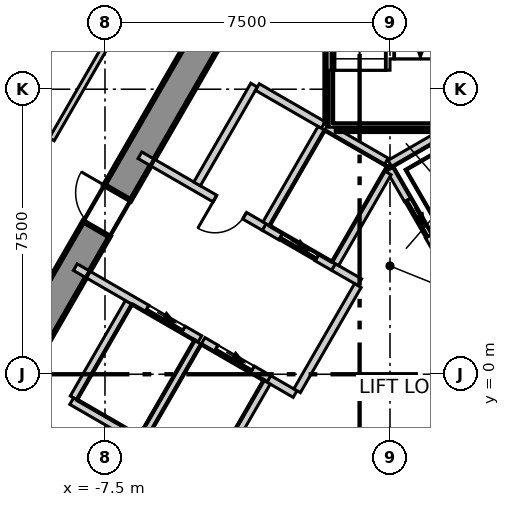
"""IFC4 building model, lengths in metres.
Left out: names, types, materials, properties, quantities, classifications, styles, units other than length and angle.
Written with IfcOpenShell. Run it as: python <this file> out.ifc"""

import sys

from ifc_helpers import new_model, si_unit, direction, frame, frame_2d, origin, place, context, subcontext, project, spatial, polyline, rectangle, outline, extrude, element, fill, save


model = new_model("IFC4")
c1 = context("Model", 3, precision=1e-05, world=origin(), true_north=direction((0.0, 1.0)))
c2 = subcontext(c1, "Body", "Model", "MODEL_VIEW")
j1 = project(units=[si_unit("LENGTHUNIT", "METRE"), si_unit("PLANEANGLEUNIT", "RADIAN")], contexts=[c1])
p1 = place(None, origin())
s1 = spatial("IfcSite", under=j1, at=p1, CompositionType="ELEMENT")
p2 = place(p1, origin())
s2 = spatial("IfcBuilding", under=s1, at=p2, CompositionType="ELEMENT")
p3 = place(p2, frame((0.0, 0.0, 140.3)))
s3 = spatial("IfcBuildingStorey", under=s2, at=p3, CompositionType="ELEMENT", Elevation=140.3)
p4 = place(p3, frame((-1.674, 14.3, -0.3), z_axis=(0.0, 0.0, 1.0), x_axis=(-0.499995765644, -0.866027848477, 0.0)))
e1 = element("IfcWall", 1, at=p4, inside=s3, PredefinedType="SHEAR", context=c2, shape_type="SweptSolid", body=[
    extrude(outline(polyline([(-0.231, -0.4), (1.732, -0.4), (3.695, -0.4), (5.658, -0.4), (7.621, -0.4), (9.584, -0.4), (11.547, -0.4), (13.51, -0.4), (15.473, -0.4), (17.436, -0.4), (19.399, -0.4), (21.362, -0.4), (23.325, -0.4), (22.863, 0.4), (20.977, 0.4), (19.091, 0.4), (17.205, 0.4), (15.319, 0.4), (13.433, 0.4), (11.547, 0.4), (9.661, 0.4), (7.775, 0.4), (5.889, 0.4), (4.003, 0.4), (2.117, 0.4), (0.231, 0.4), (-0.231, -0.4)])), origin(), (0.0, 0.0, 1.0), 4.0),
])
p5 = place(p4, frame((10.997, 0.0, 0.3)))
e2 = element("IfcOpeningElement", 2, at=p5, cuts=e1, PredefinedType="OPENING", context=c2, shape_type="SweptSolid", body=[
    extrude(rectangle(XDim=1.1, YDim=2.1, at=frame_2d((0.55, 1.05))), frame((0.0, 0.41, 0.0), z_axis=(0.0, -1.0, 0.0), x_axis=(1.0, 0.0, 0.0)), (0.0, 0.0, 1.0), 0.82),
])
p6 = place(p4, frame((4.474, 0.0, 0.3)))
e3 = element("IfcOpeningElement", 3, at=p6, cuts=e1, PredefinedType="OPENING", context=c2, shape_type="SweptSolid", body=[
    extrude(rectangle(XDim=0.9, YDim=2.1, at=frame_2d((0.45, 1.05))), frame((0.0, 0.41, 0.0), z_axis=(0.0, -1.0, 0.0), x_axis=(1.0, 0.0, 0.0)), (0.0, 0.0, 1.0), 0.82),
])
p7 = place(p3, frame((-3.063, 34.172, 0.0), z_axis=(0.0, 0.0, 1.0), x_axis=(-0.500008098571, -0.866020728022, 0.0)))
e4 = element("IfcWall", 4, at=p7, inside=s3, PredefinedType="ELEMENTEDWALL", context=c2, shape_type="SweptSolid", body=[
    extrude(rectangle(XDim=56.105, YDim=0.2, at=frame_2d((28.052, 0.0))), origin(), (0.0, 0.0, 1.0), 3.7),
])
p8 = place(p7, frame((2.197, 0.0, 0.9)))
e5 = element("IfcOpeningElement", 5, at=p8, cuts=e4, PredefinedType="OPENING", context=c2, shape_type="SweptSolid", body=[
    extrude(rectangle(XDim=4.9, YDim=2.5, at=frame_2d((2.45, 1.25))), frame((0.0, 0.11, 0.0), z_axis=(0.0, -1.0, 0.0), x_axis=(1.0, 0.0, 0.0)), (0.0, 0.0, 1.0), 0.22),
])
p9 = place(p7, frame((8.887, 0.0, 0.9)))
e6 = element("IfcOpeningElement", 6, at=p9, cuts=e4, PredefinedType="OPENING", context=c2, shape_type="SweptSolid", body=[
    extrude(rectangle(XDim=4.9, YDim=2.5, at=frame_2d((2.45, 1.25))), frame((0.0, 0.11, 0.0), z_axis=(0.0, -1.0, 0.0), x_axis=(1.0, 0.0, 0.0)), (0.0, 0.0, 1.0), 0.22),
])
p10 = place(p7, frame((15.577, 0.0, 0.9)))
e7 = element("IfcOpeningElement", 7, at=p10, cuts=e4, PredefinedType="OPENING", context=c2, shape_type="SweptSolid", body=[
    extrude(rectangle(XDim=4.9, YDim=2.5, at=frame_2d((2.45, 1.25))), frame((0.0, 0.11, 0.0), z_axis=(0.0, -1.0, 0.0), x_axis=(1.0, 0.0, 0.0)), (0.0, 0.0, 1.0), 0.22),
])
p11 = place(p7, frame((22.267, 0.0, 0.9)))
e8 = element("IfcOpeningElement", 8, at=p11, cuts=e4, PredefinedType="OPENING", context=c2, shape_type="SweptSolid", body=[
    extrude(rectangle(XDim=4.9, YDim=2.5, at=frame_2d((2.45, 1.25))), frame((0.0, 0.11, 0.0), z_axis=(0.0, -1.0, 0.0), x_axis=(1.0, 0.0, 0.0)), (0.0, 0.0, 1.0), 0.22),
])
p12 = place(p7, frame((28.957, 0.0, 0.9)))
e9 = element("IfcOpeningElement", 9, at=p12, cuts=e4, PredefinedType="OPENING", context=c2, shape_type="SweptSolid", body=[
    extrude(rectangle(XDim=4.9, YDim=2.5, at=frame_2d((2.45, 1.25))), frame((0.0, 0.11, 0.0), z_axis=(0.0, -1.0, 0.0), x_axis=(1.0, 0.0, 0.0)), (0.0, 0.0, 1.0), 0.22),
])
p13 = place(p7, frame((35.647, 0.0, 0.9)))
e10 = element("IfcOpeningElement", 10, at=p13, cuts=e4, PredefinedType="OPENING", context=c2, shape_type="SweptSolid", body=[
    extrude(rectangle(XDim=4.9, YDim=2.5, at=frame_2d((2.45, 1.25))), frame((0.0, 0.11, 0.0), z_axis=(0.0, -1.0, 0.0), x_axis=(1.0, 0.0, 0.0)), (0.0, 0.0, 1.0), 0.22),
])
p14 = place(p7, frame((42.337, 0.0, 0.9)))
e11 = element("IfcOpeningElement", 11, at=p14, cuts=e4, PredefinedType="OPENING", context=c2, shape_type="SweptSolid", body=[
    extrude(rectangle(XDim=4.9, YDim=2.5, at=frame_2d((2.45, 1.25))), frame((0.0, 0.11, 0.0), z_axis=(0.0, -1.0, 0.0), x_axis=(1.0, 0.0, 0.0)), (0.0, 0.0, 1.0), 0.22),
])
p15 = place(p7, frame((49.027, 0.0, 0.9)))
e12 = element("IfcOpeningElement", 12, at=p15, cuts=e4, PredefinedType="OPENING", context=c2, shape_type="SweptSolid", body=[
    extrude(rectangle(XDim=4.9, YDim=2.5, at=frame_2d((2.45, 1.25))), frame((0.0, 0.11, 0.0), z_axis=(0.0, -1.0, 0.0), x_axis=(1.0, 0.0, 0.0)), (0.0, 0.0, 1.0), 0.22),
])
p16 = place(p3, frame((-8.902, 6.181, 0.0), z_axis=(0.0, 0.0, 1.0), x_axis=(0.499992688384, 0.866029625107, 0.0)))
e13 = element("IfcWall", 13, at=p16, inside=s3, PredefinedType="PARTITIONING", context=c2, shape_type="SweptSolid", body=[
    extrude(rectangle(XDim=17.804, YDim=0.15, at=frame_2d((8.902, 0.0))), origin(), (0.0, 0.0, 1.0), 3.7),
])
p17 = place(p16, frame((14.554, 0.0, 0.0)))
e14 = element("IfcOpeningElement", 14, at=p17, cuts=e13, PredefinedType="OPENING", context=c2, shape_type="SweptSolid", body=[
    extrude(rectangle(XDim=1.1, YDim=2.1, at=frame_2d((0.55, 1.05))), frame((0.0, 0.085, 0.0), z_axis=(0.0, -1.0, 0.0), x_axis=(1.0, 0.0, 0.0)), (0.0, 0.0, 1.0), 0.17),
])
p18 = place(p16, frame((10.428, 0.0, 0.0)))
e15 = element("IfcOpeningElement", 15, at=p18, cuts=e13, PredefinedType="OPENING", context=c2, shape_type="SweptSolid", body=[
    extrude(rectangle(XDim=0.9, YDim=2.1, at=frame_2d((0.45, 1.05))), frame((0.0, 0.085, 0.0), z_axis=(0.0, -1.0, 0.0), x_axis=(1.0, 0.0, 0.0)), (0.0, 0.0, 1.0), 0.17),
])
p19 = place(p16, frame((7.228, 0.0, 0.0)))
e16 = element("IfcOpeningElement", 16, at=p19, cuts=e13, PredefinedType="OPENING", context=c2, shape_type="SweptSolid", body=[
    extrude(rectangle(XDim=0.9, YDim=2.1, at=frame_2d((0.45, 1.05))), frame((0.0, 0.085, 0.0), z_axis=(0.0, -1.0, 0.0), x_axis=(1.0, 0.0, 0.0)), (0.0, 0.0, 1.0), 0.17),
])
p20 = place(p16, frame((4.428, 0.0, 0.0)))
e17 = element("IfcOpeningElement", 17, at=p20, cuts=e13, PredefinedType="OPENING", context=c2, shape_type="SweptSolid", body=[
    extrude(rectangle(XDim=1.0, YDim=2.1, at=frame_2d((0.5, 1.05))), frame((0.0, 0.085, 0.0), z_axis=(0.0, -1.0, 0.0), x_axis=(1.0, 0.0, 0.0)), (0.0, 0.0, 1.0), 0.17),
])
p21 = place(p3, frame((0.076, 21.468, 0.0), z_axis=(0.0, 0.0, 1.0), x_axis=(0.499999691263, -0.866025582034, 0.0)))
e18 = element("IfcWall", 18, at=p21, inside=s3, PredefinedType="PARTITIONING", context=c2, shape_type="SweptSolid", body=[
    extrude(rectangle(XDim=24.342, YDim=0.15, at=frame_2d((12.171, 0.0))), origin(), (0.0, 0.0, 1.0), 3.7),
])
p22 = place(p21, frame((17.594, 0.0, 0.0)))
e19 = element("IfcOpeningElement", 19, at=p22, cuts=e18, PredefinedType="OPENING", context=c2, shape_type="SweptSolid", body=[
    extrude(rectangle(XDim=1.1, YDim=2.1, at=frame_2d((0.55, 1.05))), frame((0.0, 0.085, 0.0), z_axis=(0.0, -1.0, 0.0), x_axis=(1.0, 0.0, 0.0)), (0.0, 0.0, 1.0), 0.17),
])
p23 = place(p21, frame((6.814, 0.0, 0.0)))
e20 = element("IfcOpeningElement", 20, at=p23, cuts=e18, PredefinedType="OPENING", context=c2, shape_type="SweptSolid", body=[
    extrude(rectangle(XDim=1.0, YDim=2.1, at=frame_2d((0.5, 1.05))), frame((0.0, 0.085, 0.0), z_axis=(0.0, -1.0, 0.0), x_axis=(1.0, 0.0, 0.0)), (0.0, 0.0, 1.0), 0.17),
])
p24 = place(p21, frame((10.214, 0.0, 0.0)))
e21 = element("IfcOpeningElement", 21, at=p24, cuts=e18, PredefinedType="OPENING", context=c2, shape_type="SweptSolid", body=[
    extrude(rectangle(XDim=0.9, YDim=2.1, at=frame_2d((0.45, 1.05))), frame((0.0, 0.085, 0.0), z_axis=(0.0, -1.0, 0.0), x_axis=(1.0, 0.0, 0.0)), (0.0, 0.0, 1.0), 0.17),
])
p25 = place(p21, frame((1.924, 0.0, 0.0)))
e22 = element("IfcOpeningElement", 22, at=p25, cuts=e18, PredefinedType="OPENING", context=c2, shape_type="SweptSolid", body=[
    extrude(rectangle(XDim=1.1, YDim=2.1, at=frame_2d((0.55, 1.05))), frame((0.0, 0.085, 0.0), z_axis=(0.0, -1.0, 0.0), x_axis=(1.0, 0.0, 0.0)), (0.0, 0.0, 1.0), 0.17),
])
p26 = place(p3, frame((-8.376, -0.707, 0.0), z_axis=(0.0, 0.0, 1.0), x_axis=(0.866067520717, -0.499927044236, 0.0)))
e23 = element("IfcWall", 23, at=p26, inside=s3, PredefinedType="SOLIDWALL", context=c2, shape_type="SweptSolid", body=[
    extrude(rectangle(XDim=2.1, YDim=0.2, at=frame_2d((1.05, 0.0))), origin(), (0.0, 0.0, 1.0), 3.7),
])
p27 = place(p3, frame((-8.326, -0.62, 0.0), z_axis=(0.0, 0.0, 1.0), x_axis=(0.500023687443, 0.866011727401, 0.0)))
e24 = element("IfcWall", 24, at=p27, inside=s3, PredefinedType="SOLIDWALL", context=c2, shape_type="SweptSolid", body=[
    extrude(rectangle(XDim=2.9, YDim=0.2, at=frame_2d((1.45, 0.0))), origin(), (0.0, 0.0, 1.0), 3.7),
])
p28 = place(p3, frame((-0.002, 5.542, 0.0), z_axis=(0.0, 0.0, 1.0), x_axis=(0.866103910842, 0.499863997127, 0.0)))
e25 = element("IfcWall", 25, at=p28, inside=s3, PredefinedType="SOLIDWALL", context=c2, shape_type="SweptSolid", body=[
    extrude(rectangle(XDim=4.131, YDim=0.2, at=frame_2d((2.065, 0.0))), origin(), (0.0, 0.0, 1.0), 3.7),
])
p29 = place(p3, frame((0.0, 5.4, 0.0), z_axis=(0.0, 0.0, 1.0), x_axis=(0.500103862429, -0.865965430478, 0.0)))
e26 = element("IfcWall", 26, at=p29, inside=s3, PredefinedType="SOLIDWALL", context=c2, shape_type="SweptSolid", body=[
    extrude(rectangle(XDim=2.973, YDim=0.2, at=frame_2d((1.487, 0.0))), origin(), (0.0, 0.0, 1.0), 3.7),
])
p30 = place(p29, frame((0.937, 0.0, 0.0)))
e27 = element("IfcOpeningElement", 27, at=p30, cuts=e26, PredefinedType="OPENING", context=c2, shape_type="SweptSolid", body=[
    extrude(rectangle(XDim=1.1, YDim=2.1, at=frame_2d((0.55, 1.05))), frame((0.0, 0.11, 0.0), z_axis=(0.0, -1.0, 0.0), x_axis=(1.0, 0.0, 0.0)), (0.0, 0.0, 1.0), 0.22),
])
p31 = place(p3, frame((-8.28, 2.818, 0.0), z_axis=(0.0, 0.0, 1.0), x_axis=(0.86600175068, -0.50004096614, 0.0)))
e28 = element("IfcWall", 28, at=p31, inside=s3, PredefinedType="SOLIDWALL", context=c2, shape_type="SweptSolid", body=[
    extrude(rectangle(XDim=3.782, YDim=0.2, at=frame_2d((1.891, 0.0))), origin(), (0.0, 0.0, 1.0), 3.7),
])
p32 = place(p31, frame((2.18, 0.0, 0.0)))
e29 = element("IfcOpeningElement", 29, at=p32, cuts=e28, PredefinedType="OPENING", context=c2, shape_type="SweptSolid", body=[
    extrude(rectangle(XDim=1.1, YDim=2.1, at=frame_2d((0.55, 1.05))), frame((0.0, 0.11, 0.0), z_axis=(0.0, -1.0, 0.0), x_axis=(1.0, 0.0, 0.0)), (0.0, 0.0, 1.0), 0.22),
])
p33 = place(p3, frame((-3.188, -0.122, 0.0), z_axis=(0.0, 0.0, 1.0), x_axis=(0.865705793592, -0.50055317294, 0.0)))
e30 = element("IfcWall", 30, at=p33, inside=s3, PredefinedType="SOLIDWALL", context=c2, shape_type="SweptSolid", body=[
    extrude(rectangle(XDim=0.797, YDim=0.2, at=frame_2d((0.398, 0.0))), origin(), (0.0, 0.0, 1.0), 3.7),
])
p34 = place(p3, frame((-6.58, 5.762, 0.0), z_axis=(0.0, 0.0, 1.0), x_axis=(0.866029704776, -0.49999255039, 0.0)))
e31 = element("IfcWall", 31, at=p34, inside=s3, PredefinedType="SOLIDWALL", context=c2, shape_type="SweptSolid", body=[
    extrude(rectangle(XDim=3.782, YDim=0.2, at=frame_2d((1.891, 0.0))), origin(), (0.0, 0.0, 1.0), 3.7),
])
p35 = place(p34, frame((2.279, 0.0, 0.0)))
e32 = element("IfcOpeningElement", 32, at=p35, cuts=e31, PredefinedType="OPENING", context=c2, shape_type="SweptSolid", body=[
    extrude(rectangle(XDim=0.9, YDim=2.1, at=frame_2d((0.45, 1.05))), frame((0.0, 0.11, 0.0), z_axis=(0.0, -1.0, 0.0), x_axis=(1.0, 0.0, 0.0)), (0.0, 0.0, 1.0), 0.22),
])
p36 = place(p3, frame((-1.488, 2.822, 0.0), z_axis=(0.0, 0.0, 1.0), x_axis=(0.866236612152, -0.499633997809, 0.0)))
e33 = element("IfcWall", 33, at=p36, inside=s3, PredefinedType="SOLIDWALL", context=c2, shape_type="SweptSolid", body=[
    extrude(rectangle(XDim=0.796, YDim=0.2, at=frame_2d((0.398, 0.0))), origin(), (0.0, 0.0, 1.0), 3.7),
])
p37 = place(p3, frame((-5.076, 5.009, 0.0), z_axis=(0.0, 0.0, 1.0), x_axis=(0.50002537861, 0.866010750942, 0.0)))
e34 = element("IfcWall", 34, at=p37, inside=s3, PredefinedType="SOLIDWALL", context=c2, shape_type="SweptSolid", body=[
    extrude(rectangle(XDim=3.0, YDim=0.2, at=frame_2d((1.5, 0.0))), origin(), (0.0, 0.0, 1.0), 3.7),
])
p38 = place(p3, frame((-3.489, 7.557, 0.0), z_axis=(0.0, 0.0, 1.0), x_axis=(0.866010750942, -0.50002537861, 0.0)))
e35 = element("IfcWall", 35, at=p38, inside=s3, PredefinedType="SOLIDWALL", context=c2, shape_type="SweptSolid", body=[
    extrude(rectangle(XDim=2.0, YDim=0.2, at=frame_2d((1.0, 0.0))), origin(), (0.0, 0.0, 1.0), 3.7),
])
p39 = place(p3, frame((-2.444, -0.433, 0.0), z_axis=(0.0, 0.0, 1.0), x_axis=(0.500035624827, 0.866004834804, 0.0)))
e36 = element("IfcWall", 36, at=p39, inside=s3, PredefinedType="SOLIDWALL", context=c2, shape_type="SweptSolid", body=[
    extrude(rectangle(XDim=3.194, YDim=0.2, at=frame_2d((1.597, 0.0))), origin(), (0.0, 0.0, 1.0), 3.7),
])
p40 = place(p3, frame((-6.507, -1.67, 0.0), z_axis=(0.0, 0.0, 1.0), x_axis=(0.50012328804, 0.865954211699, 0.0)))
e37 = element("IfcWall", 37, at=p40, inside=s3, PredefinedType="SOLIDWALL", context=c2, shape_type="SweptSolid", body=[
    extrude(rectangle(XDim=2.9, YDim=0.2, at=frame_2d((1.45, 0.0))), origin(), (0.0, 0.0, 1.0), 3.7),
])
p41 = place(p3, frame((-4.92, 0.878, 0.0), z_axis=(0.0, 0.0, 1.0), x_axis=(0.866010750942, -0.50002537861, 0.0)))
e38 = element("IfcWall", 38, at=p41, inside=s3, PredefinedType="SOLIDWALL", context=c2, shape_type="SweptSolid", body=[
    extrude(rectangle(XDim=2.0, YDim=0.2, at=frame_2d((1.0, 0.0))), origin(), (0.0, 0.0, 1.0), 3.7),
])
p42 = place(p41, frame((0.4, 0.0, 0.0)))
e39 = element("IfcOpeningElement", 39, at=p42, cuts=e38, PredefinedType="OPENING", context=c2, shape_type="SweptSolid", body=[
    extrude(rectangle(XDim=1.1, YDim=2.1, at=frame_2d((0.55, 1.05))), frame((0.0, 0.11, 0.0), z_axis=(0.0, -1.0, 0.0), x_axis=(1.0, 0.0, 0.0)), (0.0, 0.0, 1.0), 0.22),
])
p43 = place(p3, frame((-4.619, -2.6, 0.0), z_axis=(0.0, 0.0, 1.0), x_axis=(0.50009492287, 0.865970593103, 0.0)))
e40 = element("IfcWall", 40, at=p43, inside=s3, PredefinedType="SOLIDWALL", context=c2, shape_type="SweptSolid", body=[
    extrude(rectangle(XDim=2.761, YDim=0.2, at=frame_2d((1.381, 0.0))), origin(), (0.0, 0.0, 1.0), 3.7),
])
p44 = place(p3, frame((-3.309, 3.873, 0.0), z_axis=(0.0, 0.0, 1.0), x_axis=(0.866098583652, -0.499873227325, 0.0)))
e41 = element("IfcWall", 41, at=p44, inside=s3, PredefinedType="SOLIDWALL", context=c2, shape_type="SweptSolid", body=[
    extrude(rectangle(XDim=2.103, YDim=0.2, at=frame_2d((1.051, 0.0))), origin(), (0.0, 0.0, 1.0), 3.7),
])
p45 = place(p44, frame((0.502, 0.0, 0.0)))
e42 = element("IfcOpeningElement", 42, at=p45, cuts=e41, PredefinedType="OPENING", context=c2, shape_type="SweptSolid", body=[
    extrude(rectangle(XDim=1.1, YDim=2.1, at=frame_2d((0.55, 1.05))), frame((0.0, 0.11, 0.0), z_axis=(0.0, -1.0, 0.0), x_axis=(1.0, 0.0, 0.0)), (0.0, 0.0, 1.0), 0.22),
])
p46 = place(p3, frame((-3.257, 3.959, 0.0), z_axis=(0.0, 0.0, 1.0), x_axis=(0.50012328804, 0.865954211699, 0.0)))
e43 = element("IfcWall", 43, at=p46, inside=s3, PredefinedType="SOLIDWALL", context=c2, shape_type="SweptSolid", body=[
    extrude(rectangle(XDim=2.9, YDim=0.2, at=frame_2d((1.45, 0.0))), origin(), (0.0, 0.0, 1.0), 3.7),
])
p47 = place(p3, frame((-1.67, 6.507, 0.0), z_axis=(0.0, 0.0, 1.0), x_axis=(0.865941441609, -0.500145398563, 0.0)))
e44 = element("IfcWall", 44, at=p47, inside=s3, PredefinedType="SOLIDWALL", context=c2, shape_type="SweptSolid", body=[
    extrude(rectangle(XDim=1.815, YDim=0.2, at=frame_2d((0.908, 0.0))), origin(), (0.0, 0.0, 1.0), 3.7),
])
p48 = place(p3, frame((-1.438, 2.909, 0.0), z_axis=(0.0, 0.0, 1.0), x_axis=(0.499829630636, 0.866123744241, 0.0)))
e45 = element("IfcWall", 45, at=p48, inside=s3, PredefinedType="SOLIDWALL", context=c2, shape_type="SweptSolid", body=[
    extrude(rectangle(XDim=2.761, YDim=0.2, at=frame_2d((1.38, 0.0))), origin(), (0.0, 0.0, 1.0), 3.7),
])
p49 = place(p3, frame((-1.4, 6.5, 0.0), z_axis=(0.0, 0.0, 1.0), x_axis=(1.0, 0.0, 0.0)))
e46 = element("IfcWall", 46, at=p49, inside=s3, PredefinedType="SOLIDWALL", context=c2, shape_type="SweptSolid", body=[
    extrude(rectangle(XDim=2.8, YDim=0.2, at=frame_2d((1.4, 0.0))), origin(), (0.0, 0.0, 1.0), 3.7),
])
p50 = place(p3, frame((-1.6, 6.615, 0.0), z_axis=(0.0, 0.0, 1.0), x_axis=(0.0, 1.0, 0.0)))
e47 = element("IfcWall", 47, at=p50, inside=s3, PredefinedType="SOLIDWALL", context=c2, shape_type="SweptSolid", body=[
    extrude(rectangle(XDim=7.665, YDim=0.2, at=frame_2d((3.833, 0.0))), origin(), (0.0, 0.0, 1.0), 3.7),
])
p51 = place(p30, origin())
e48 = element("IfcDoor", 48, at=p51, inside=s3, OperationType="SLIDING_TO_LEFT", PredefinedType="DOOR", context=c2, shape_type="SweptSolid", body=[
    extrude(rectangle(XDim=1.1, YDim=2.1, at=frame_2d((0.55, 1.05))), frame((0.0, 0.025, 0.0), z_axis=(0.0, -1.0, 0.0), x_axis=(1.0, 0.0, 0.0)), (0.0, 0.0, 1.0), 0.05),
])
fill(e27, e48)
p52 = place(p42, origin())
e49 = element("IfcDoor", 49, at=p52, inside=s3, OperationType="SLIDING_TO_LEFT", PredefinedType="DOOR", context=c2, shape_type="SweptSolid", body=[
    extrude(rectangle(XDim=1.1, YDim=2.1, at=frame_2d((0.55, 1.05))), frame((0.0, 0.025, 0.0), z_axis=(0.0, -1.0, 0.0), x_axis=(1.0, 0.0, 0.0)), (0.0, 0.0, 1.0), 0.05),
])
fill(e39, e49)
p53 = place(p45, origin())
e50 = element("IfcDoor", 50, at=p53, inside=s3, OperationType="SLIDING_TO_LEFT", PredefinedType="DOOR", context=c2, shape_type="SweptSolid", body=[
    extrude(rectangle(XDim=1.1, YDim=2.1, at=frame_2d((0.55, 1.05))), frame((0.0, 0.025, 0.0), z_axis=(0.0, -1.0, 0.0), x_axis=(1.0, 0.0, 0.0)), (0.0, 0.0, 1.0), 0.05),
])
fill(e42, e50)
p54 = place(p32, origin())
e51 = element("IfcDoor", 51, at=p54, inside=s3, OperationType="SLIDING_TO_LEFT", PredefinedType="DOOR", context=c2, shape_type="SweptSolid", body=[
    extrude(rectangle(XDim=1.1, YDim=2.1, at=frame_2d((0.55, 1.05))), frame((0.0, 0.025, 0.0), z_axis=(0.0, -1.0, 0.0), x_axis=(1.0, 0.0, 0.0)), (0.0, 0.0, 1.0), 0.05),
])
fill(e29, e51)
p55 = place(p35, origin())
e52 = element("IfcDoor", 52, at=p55, inside=s3, OperationType="SINGLE_SWING_LEFT", PredefinedType="DOOR", context=c2, shape_type="SweptSolid", body=[
    extrude(rectangle(XDim=0.9, YDim=2.1, at=frame_2d((0.45, 1.05))), frame((0.0, 0.025, 0.0), z_axis=(0.0, -1.0, 0.0), x_axis=(1.0, 0.0, 0.0)), (0.0, 0.0, 1.0), 0.05),
])
fill(e32, e52)
p56 = place(p5, origin())
e53 = element("IfcDoor", 53, at=p56, inside=s3, OperationType="SINGLE_SWING_LEFT", PredefinedType="DOOR", context=c2, shape_type="SweptSolid", body=[
    extrude(rectangle(XDim=1.1, YDim=2.1, at=frame_2d((0.55, 1.05))), frame((0.0, 0.025, 0.0), z_axis=(0.0, -1.0, 0.0), x_axis=(1.0, 0.0, 0.0)), (0.0, 0.0, 1.0), 0.05),
])
fill(e2, e53)
save(model, sys.argv[1])
